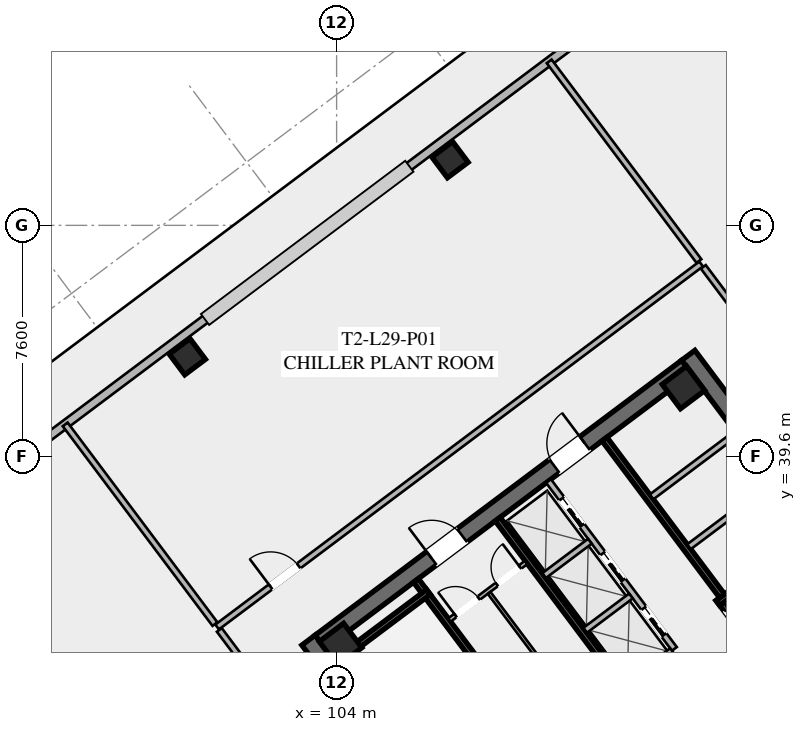
"""IFC4 building model, lengths in metres.
Left out: names, types, materials, properties, quantities, classifications, styles, units other than length and angle.
Written with IfcOpenShell. Run it as: python <this file> out.ifc"""

import sys

from ifc_helpers import new_model, si_unit, direction, frame, frame_2d, origin, origin_2d, place, context, subcontext, project, spatial, rectangle, hollow_rectangle, extrude, element, fill, save


model = new_model("IFC4")
c1 = context("Model", 3, precision=1e-05, world=origin(), true_north=direction((0.0, 1.0)))
c2 = subcontext(c1, "Body", "Model", "MODEL_VIEW")
j1 = project(units=[si_unit("LENGTHUNIT", "METRE"), si_unit("PLANEANGLEUNIT", "RADIAN")], contexts=[c1])
p1 = place(None, origin())
s1 = spatial("IfcSite", under=j1, at=p1, CompositionType="ELEMENT")
p2 = place(p1, origin())
s2 = spatial("IfcBuilding", under=s1, at=p2, CompositionType="ELEMENT")
p3 = place(p2, frame((0.0, 0.0, 109.8)))
s3 = spatial("IfcBuildingStorey", under=s2, at=p3, CompositionType="ELEMENT", Elevation=109.8)
for number, where, z_axis, x_axis in (
    (1, (112.436, 21.077, 0.0), (0.0, 0.0, 1.0), (-0.6, 0.8, 0.0)),
    (2, (115.564, 42.923, 0.0), (0.0, 0.0, 1.0), (0.6, -0.8, 0.0)),
):
    element("IfcWall", number, at=place(p3, frame(where, z_axis=z_axis, x_axis=x_axis)), inside=s3, PredefinedType="SHEAR", context=c2, shape_type="SweptSolid", body=[
        extrude(rectangle(XDim=15.6, YDim=0.55, at=frame_2d((7.8, 0.0))), origin(), (0.0, 0.0, 1.0), 4.6),
    ])
p4 = place(p3, frame((103.461, 33.502, 0.0), z_axis=(0.0, 0.0, 1.0), x_axis=(0.799998054672, 0.600002593761, 0.0)))
e3 = element("IfcWall", 3, at=p4, inside=s3, PredefinedType="SHEAR", context=c2, shape_type="SweptSolid", body=[
    extrude(rectangle(XDim=15.06, YDim=0.55, at=frame_2d((7.53, 0.0))), origin(), (0.0, 0.0, 1.0), 4.6),
])
p5 = place(p4, frame((4.58, 0.0, 0.0)))
e4 = element("IfcOpeningElement", 4, at=p5, cuts=e3, PredefinedType="OPENING", context=c2, shape_type="SweptSolid", body=[
    extrude(rectangle(XDim=1.25, YDim=2.25, at=frame_2d((0.625, 1.125))), frame((0.0, 0.285, 0.0), z_axis=(0.0, -1.0, 0.0), x_axis=(1.0, 0.0, 0.0)), (0.0, 0.0, 1.0), 0.57),
])
p6 = place(p4, frame((9.63, 0.0, 0.0)))
e5 = element("IfcOpeningElement", 5, at=p6, cuts=e3, PredefinedType="OPENING", context=c2, shape_type="SweptSolid", body=[
    extrude(rectangle(XDim=1.25, YDim=2.25, at=frame_2d((0.625, 1.125))), frame((0.0, 0.285, 0.0), z_axis=(0.0, -1.0, 0.0), x_axis=(1.0, 0.0, 0.0)), (0.0, 0.0, 1.0), 0.57),
])
for number, where, z_axis, x_axis in (
    (6, (115.41, 41.87, 0.0), (0.0, 0.0, 1.0), (0.8, 0.6, 0.0)),
    (7, (104.13, 33.41, 0.0), (0.0, 0.0, 1.0), (0.8, 0.6, 0.0)),
):
    element("IfcColumn", number, at=place(p3, frame(where, z_axis=z_axis, x_axis=x_axis)), inside=s3, PredefinedType="COLUMN", context=c2, shape_type="SweptSolid", body=[
        extrude(hollow_rectangle(XDim=1.0, YDim=1.0, WallThickness=0.04, at=origin_2d()), origin(), (0.0, 0.0, 1.0), 4.42),
    ])
for number, where, z_axis, x_axis in (
    (8, (107.73, 49.36, -0.295), (0.0, 0.0, 1.0), (0.8, 0.6, 0.0)),
    (9, (99.09, 42.88, -0.295), (0.0, 0.0, 1.0), (0.8, 0.6, 0.0)),
):
    element("IfcColumn", number, at=place(p3, frame(where, z_axis=z_axis, x_axis=x_axis)), inside=s3, PredefinedType="COLUMN", context=c2, shape_type="SweptSolid", body=[
        extrude(hollow_rectangle(XDim=0.85, YDim=0.85, WallThickness=0.035, at=origin_2d()), origin(), (0.0, 0.0, 1.0), 4.715),
    ])
for number, where, z_axis, x_axis in (
    (10, (108.904, 8.328, 0.0), (0.0, 0.0, 1.0), (-0.6, 0.8, 0.0)),
    (11, (90.328, 37.096, 0.0), (0.0, 0.0, 1.0), (0.8, 0.6, 0.0)),
):
    element("IfcWall", number, at=place(p3, frame(where, z_axis=z_axis, x_axis=x_axis)), inside=s3, PredefinedType="SOLIDWALL", context=c2, shape_type="SweptSolid", body=[
        extrude(rectangle(XDim=31.76, YDim=0.28, at=frame_2d((15.88, 0.0))), origin(), (0.0, 0.0, 1.0), 4.42),
    ])
p7 = place(p3, frame((111.44, 29.08, 0.0), z_axis=(0.0, 0.0, 1.0), x_axis=(-0.59999029481, 0.8000072788, 0.0)))
e12 = element("IfcWall", 12, at=p7, inside=s3, PredefinedType="SHEAR", context=c2, shape_type="SweptSolid", body=[
    extrude(rectangle(XDim=8.05, YDim=0.2, at=frame_2d((4.025, 0.0))), origin(), (0.0, 0.0, 1.0), 4.42),
])
p8 = place(p7, frame((0.45, 0.0, 0.0)))
e13 = element("IfcOpeningElement", 13, at=p8, cuts=e12, PredefinedType="OPENING", context=c2, shape_type="SweptSolid", body=[
    extrude(rectangle(XDim=1.15, YDim=2.2, at=frame_2d((0.575, 1.1))), frame((0.0, 0.11, 0.0), z_axis=(0.0, -1.0, 0.0), x_axis=(1.0, 0.0, 0.0)), (0.0, 0.0, 1.0), 0.22),
])
p9 = place(p3, frame((103.956, 32.842, 0.0), z_axis=(0.0, 0.0, 1.0), x_axis=(0.800015298837, 0.599979601008, 0.0)))
e14 = element("IfcWall", 14, at=p9, inside=s3, PredefinedType="SHEAR", context=c2, shape_type="SweptSolid", body=[
    extrude(rectangle(XDim=3.83, YDim=0.2, at=frame_2d((1.915, 0.0))), origin(), (0.0, 0.0, 1.0), 4.42),
])
p10 = place(p3, frame((116.56, 34.92, 0.0), z_axis=(0.0, 0.0, 1.0), x_axis=(0.59999029481, -0.8000072788, 0.0)))
e15 = element("IfcWall", 15, at=p10, inside=s3, PredefinedType="SHEAR", context=c2, shape_type="SweptSolid", body=[
    extrude(rectangle(XDim=8.05, YDim=0.2, at=frame_2d((4.025, 0.0))), origin(), (0.0, 0.0, 1.0), 4.42),
])
p11 = place(p10, frame((0.45, 0.0, 0.0)))
e16 = element("IfcOpeningElement", 16, at=p11, cuts=e15, PredefinedType="OPENING", context=c2, shape_type="SweptSolid", body=[
    extrude(rectangle(XDim=1.15, YDim=2.2, at=frame_2d((0.575, 1.1))), frame((0.0, 0.11, 0.0), z_axis=(0.0, -1.0, 0.0), x_axis=(1.0, 0.0, 0.0)), (0.0, 0.0, 1.0), 0.22),
])
p12 = place(p3, frame((116.54, 34.78, 0.0), z_axis=(0.0, 0.0, 1.0), x_axis=(0.800015298837, 0.599979601008, 0.0)))
e17 = element("IfcWall", 17, at=p12, inside=s3, PredefinedType="SHEAR", context=c2, shape_type="SweptSolid", body=[
    extrude(rectangle(XDim=3.83, YDim=0.2, at=frame_2d((1.915, 0.0))), origin(), (0.0, 0.0, 1.0), 4.42),
])
p13 = place(p3, frame((117.998, 25.936, 0.0), z_axis=(0.0, 0.0, 1.0), x_axis=(-0.600002693989, 0.799997979501, 0.0)))
e18 = element("IfcWall", 18, at=p13, inside=s3, PredefinedType="SHEAR", context=c2, shape_type="SweptSolid", body=[
    extrude(rectangle(XDim=14.5, YDim=0.2, at=frame_2d((7.25, 0.0))), origin(), (0.0, 0.0, 1.0), 4.42),
])
p14 = place(p3, frame((112.81, 40.17, 0.0), z_axis=(0.0, 0.0, 1.0), x_axis=(0.599993943644, -0.800004542231, 0.0)))
e19 = element("IfcWall", 19, at=p14, inside=s3, PredefinedType="SHEAR", context=c2, shape_type="SweptSolid", body=[
    extrude(rectangle(XDim=6.45, YDim=0.2, at=frame_2d((3.225, 0.0))), origin(), (0.0, 0.0, 1.0), 4.42),
])
for number, where, z_axis, x_axis in (
    (20, (115.59, 36.63, 0.0), (0.0, 0.0, 1.0), (0.8, 0.6, 0.0)),
    (21, (114.36, 38.27, 0.0), (0.0, 0.0, 1.0), (0.8, 0.6, 0.0)),
):
    element("IfcWall", number, at=place(p3, frame(where, z_axis=z_axis, x_axis=x_axis)), inside=s3, PredefinedType="SOLIDWALL", context=c2, shape_type="SweptSolid", body=[
        extrude(rectangle(XDim=3.48, YDim=0.2, at=frame_2d((1.74, 0.0))), origin(), (0.0, 0.0, 1.0), 4.42),
    ])
p15 = place(p3, frame((107.71, 34.22, 0.0), z_axis=(0.0, 0.0, 1.0), x_axis=(0.799981399002, 0.60002480053, 0.0)))
e22 = element("IfcWall", 22, at=p15, inside=s3, PredefinedType="PARTITIONING", context=c2, shape_type="SweptSolid", body=[
    extrude(rectangle(XDim=3.15, YDim=0.135, at=frame_2d((1.575, 0.0))), origin(), (0.0, 0.0, 1.0), 3.531),
])
p16 = place(p15, frame((0.25, 0.0, 0.0)))
e23 = element("IfcOpeningElement", 23, at=p16, cuts=e22, PredefinedType="OPENING", context=c2, shape_type="SweptSolid", body=[
    extrude(rectangle(XDim=0.95, YDim=2.05, at=frame_2d((0.475, 1.025))), frame((0.0, 0.077, 0.0), z_axis=(0.0, -1.0, 0.0), x_axis=(1.0, 0.0, 0.0)), (0.0, 0.0, 1.0), 0.155),
])
p17 = place(p15, frame((1.95, 0.0, 0.0)))
e24 = element("IfcOpeningElement", 24, at=p17, cuts=e22, PredefinedType="OPENING", context=c2, shape_type="SweptSolid", body=[
    extrude(rectangle(XDim=0.95, YDim=2.05, at=frame_2d((0.475, 1.025))), frame((0.0, 0.077, 0.0), z_axis=(0.0, -1.0, 0.0), x_axis=(1.0, 0.0, 0.0)), (0.0, 0.0, 1.0), 0.155),
])
p18 = place(p3, frame((111.296, 32.072, 0.0), z_axis=(0.0, 0.0, 1.0), x_axis=(-0.59995887973, 0.800030838552, 0.0)))
e25 = element("IfcWall", 25, at=p18, inside=s3, PredefinedType="PARTITIONING", context=c2, shape_type="SweptSolid", body=[
    extrude(rectangle(XDim=3.8, YDim=0.11, at=frame_2d((1.9, 0.0))), origin(), (0.0, 0.0, 1.0), 3.531),
])
p19 = place(p3, frame((115.11, 33.27, 0.0), z_axis=(0.0, 0.0, 1.0), x_axis=(-0.600011322243, 0.799991508192, 0.0)))
e26 = element("IfcWall", 26, at=p19, inside=s3, PredefinedType="SOLIDWALL", context=c2, shape_type="SweptSolid", body=[
    extrude(rectangle(XDim=6.9, YDim=0.2, at=frame_2d((3.45, 0.0))), origin(), (0.0, 0.0, 1.0), 4.42),
])
p20 = place(p19, frame((0.575, 0.0, 0.0)))
e27 = element("IfcOpeningElement", 27, at=p20, cuts=e26, PredefinedType="OPENING", context=c2, shape_type="SweptSolid", body=[
    extrude(rectangle(XDim=1.1, YDim=2.2, at=frame_2d((0.55, 1.1))), frame((0.0, 0.11, 0.0), z_axis=(0.0, -1.0, 0.0), x_axis=(1.0, 0.0, 0.0)), (0.0, 0.0, 1.0), 0.22),
])
p21 = place(p19, frame((2.825, 0.0, 0.0)))
e28 = element("IfcOpeningElement", 28, at=p21, cuts=e26, PredefinedType="OPENING", context=c2, shape_type="SweptSolid", body=[
    extrude(rectangle(XDim=1.1, YDim=2.2, at=frame_2d((0.55, 1.1))), frame((0.0, 0.11, 0.0), z_axis=(0.0, -1.0, 0.0), x_axis=(1.0, 0.0, 0.0)), (0.0, 0.0, 1.0), 0.22),
])
p22 = place(p19, frame((5.075, 0.0, 0.0)))
e29 = element("IfcOpeningElement", 29, at=p22, cuts=e26, PredefinedType="OPENING", context=c2, shape_type="SweptSolid", body=[
    extrude(rectangle(XDim=1.1, YDim=2.2, at=frame_2d((0.55, 1.1))), frame((0.0, 0.11, 0.0), z_axis=(0.0, -1.0, 0.0), x_axis=(1.0, 0.0, 0.0)), (0.0, 0.0, 1.0), 0.22),
])
p23 = place(p3, frame((113.526, 32.082, 0.0), z_axis=(0.0, 0.0, 1.0), x_axis=(0.800046745961, 0.599937666993, 0.0)))
e30 = element("IfcWall", 30, at=p23, inside=s3, PredefinedType="SOLIDWALL", context=c2, shape_type="SweptSolid", body=[
    extrude(rectangle(XDim=1.88, YDim=0.2, at=frame_2d((0.94, 0.0))), origin(), (0.0, 0.0, 1.0), 4.42),
])
p24 = place(p3, frame((112.176, 33.882, 0.0), z_axis=(0.0, 0.0, 1.0), x_axis=(0.8, 0.6, 0.0)))
e31 = element("IfcWall", 31, at=p24, inside=s3, PredefinedType="SOLIDWALL", context=c2, shape_type="SweptSolid", body=[
    extrude(rectangle(XDim=1.88, YDim=0.2, at=frame_2d((0.94, 0.0))), origin(), (0.0, 0.0, 1.0), 4.42),
])
p25 = place(p3, frame((110.826, 35.682, 0.0), z_axis=(0.0, 0.0, 1.0), x_axis=(0.799984418148, 0.600020775241, 0.0)))
e32 = element("IfcWall", 32, at=p25, inside=s3, PredefinedType="SOLIDWALL", context=c2, shape_type="SweptSolid", body=[
    extrude(rectangle(XDim=1.88, YDim=0.2, at=frame_2d((0.94, 0.0))), origin(), (0.0, 0.0, 1.0), 4.42),
])
p26 = place(p3, frame((100.07, 33.99, 0.0), z_axis=(0.0, 0.0, 1.0), x_axis=(0.8, 0.6, 0.0)))
e33 = element("IfcWall", 33, at=p26, inside=s3, PredefinedType="SOLIDWALL", context=c2, shape_type="SweptSolid", body=[
    extrude(rectangle(XDim=19.9, YDim=0.2, at=frame_2d((9.95, 0.0))), origin(), (0.0, 0.0, 1.0), 3.531),
])
p27 = place(p26, frame((2.2, 0.0, 0.0)))
e34 = element("IfcOpeningElement", 34, at=p27, cuts=e33, PredefinedType="OPENING", context=c2, shape_type="SweptSolid", body=[
    extrude(rectangle(XDim=1.15, YDim=2.2, at=frame_2d((0.575, 1.1))), frame((0.0, 0.11, 0.0), z_axis=(0.0, -1.0, 0.0), x_axis=(1.0, 0.0, 0.0)), (0.0, 0.0, 1.0), 0.22),
])
p28 = place(p3, frame((116.062, 45.834, 0.0), z_axis=(0.0, 0.0, 1.0), x_axis=(0.599987849816, -0.800009112494, 0.0)))
e35 = element("IfcWall", 35, at=p28, inside=s3, PredefinedType="SOLIDWALL", context=c2, shape_type="SweptSolid", body=[
    extrude(rectangle(XDim=6.43, YDim=0.2, at=frame_2d((3.215, 0.0))), origin(), (0.0, 0.0, 1.0), 3.531),
])
p29 = place(p28, frame((3.0, 0.0, 0.0)))
e36 = element("IfcOpeningElement", 36, at=p29, cuts=e35, PredefinedType="OPENING", context=c2, shape_type="SweptSolid", body=[
    extrude(rectangle(XDim=1.25, YDim=2.25, at=frame_2d((0.625, 1.125))), frame((0.0, 0.11, 0.0), z_axis=(0.0, -1.0, 0.0), x_axis=(1.0, 0.0, 0.0)), (0.0, 0.0, 1.0), 0.22),
])
p30 = place(p3, frame((111.938, 18.166, 0.0), z_axis=(0.0, 0.0, 1.0), x_axis=(-0.59999602618, 0.80000298035, 0.0)))
e37 = element("IfcWall", 37, at=p30, inside=s3, PredefinedType="SOLIDWALL", context=c2, shape_type="SweptSolid", body=[
    extrude(rectangle(XDim=19.66, YDim=0.2, at=frame_2d((9.83, 0.0))), origin(), (0.0, 0.0, 1.0), 3.531),
])
p31 = place(p30, frame((3.0, 0.0, 0.0)))
e38 = element("IfcOpeningElement", 38, at=p31, cuts=e37, PredefinedType="OPENING", context=c2, shape_type="SweptSolid", body=[
    extrude(rectangle(XDim=1.25, YDim=2.25, at=frame_2d((0.625, 1.125))), frame((0.0, 0.11, 0.0), z_axis=(0.0, -1.0, 0.0), x_axis=(1.0, 0.0, 0.0)), (0.0, 0.0, 1.0), 0.22),
])
p32 = place(p30, frame((13.2, 0.0, 0.0)))
e39 = element("IfcOpeningElement", 39, at=p32, cuts=e37, PredefinedType="OPENING", context=c2, shape_type="SweptSolid", body=[
    extrude(rectangle(XDim=1.15, YDim=2.2, at=frame_2d((0.575, 1.1))), frame((0.0, 0.11, 0.0), z_axis=(0.0, -1.0, 0.0), x_axis=(1.0, 0.0, 0.0)), (0.0, 0.0, 1.0), 0.22),
])
for number, where, z_axis, x_axis in (
    (40, (99.998, 34.086, 0.0), (0.0, 0.0, 1.0), (-0.6, 0.8, 0.0)),
    (41, (115.918, 46.026, 0.0), (0.0, 0.0, 1.0), (-0.6, 0.8, 0.0)),
):
    element("IfcWall", number, at=place(p3, frame(where, z_axis=z_axis, x_axis=x_axis)), inside=s3, PredefinedType="SOLIDWALL", context=c2, shape_type="SweptSolid", body=[
        extrude(rectangle(XDim=8.21, YDim=0.2, at=frame_2d((4.105, 0.0))), origin(), (0.0, 0.0, 1.0), 3.531),
    ])
p33 = place(p5, origin())
e42 = element("IfcDoor", 42, at=p33, inside=s3, OperationType="SINGLE_SWING_LEFT", PredefinedType="DOOR", context=c2, shape_type="SweptSolid", body=[
    extrude(rectangle(XDim=1.25, YDim=2.25, at=frame_2d((0.625, 1.125))), frame((0.0, 0.025, 0.0), z_axis=(0.0, -1.0, 0.0), x_axis=(1.0, 0.0, 0.0)), (0.0, 0.0, 1.0), 0.05),
])
fill(e4, e42)
p34 = place(p6, origin())
e43 = element("IfcDoor", 43, at=p34, inside=s3, OperationType="SINGLE_SWING_RIGHT", PredefinedType="DOOR", context=c2, shape_type="SweptSolid", body=[
    extrude(rectangle(XDim=1.25, YDim=2.25, at=frame_2d((0.625, 1.125))), frame((0.0, 0.025, 0.0), z_axis=(0.0, -1.0, 0.0), x_axis=(1.0, 0.0, 0.0)), (0.0, 0.0, 1.0), 0.05),
])
fill(e5, e43)
p35 = place(p11, origin())
e44 = element("IfcDoor", 44, at=p35, inside=s3, OperationType="SINGLE_SWING_RIGHT", PredefinedType="DOOR", context=c2, shape_type="SweptSolid", body=[
    extrude(rectangle(XDim=1.15, YDim=2.2, at=frame_2d((0.575, 1.1))), frame((0.0, 0.025, 0.0), z_axis=(0.0, -1.0, 0.0), x_axis=(1.0, 0.0, 0.0)), (0.0, 0.0, 1.0), 0.05),
])
fill(e16, e44)
p36 = place(p16, origin())
e45 = element("IfcDoor", 45, at=p36, inside=s3, OperationType="SINGLE_SWING_LEFT", PredefinedType="DOOR", context=c2, shape_type="SweptSolid", body=[
    extrude(rectangle(XDim=0.95, YDim=2.05, at=frame_2d((0.475, 1.025))), frame((0.0, 0.025, 0.0), z_axis=(0.0, -1.0, 0.0), x_axis=(1.0, 0.0, 0.0)), (0.0, 0.0, 1.0), 0.05),
])
fill(e23, e45)
p37 = place(p17, origin())
e46 = element("IfcDoor", 46, at=p37, inside=s3, OperationType="SINGLE_SWING_RIGHT", PredefinedType="DOOR", context=c2, shape_type="SweptSolid", body=[
    extrude(rectangle(XDim=0.95, YDim=2.05, at=frame_2d((0.475, 1.025))), frame((0.0, 0.025, 0.0), z_axis=(0.0, -1.0, 0.0), x_axis=(1.0, 0.0, 0.0)), (0.0, 0.0, 1.0), 0.05),
])
fill(e24, e46)
p38 = place(p27, origin())
e47 = element("IfcDoor", 47, at=p38, inside=s3, OperationType="SINGLE_SWING_LEFT", PredefinedType="DOOR", context=c2, shape_type="SweptSolid", body=[
    extrude(rectangle(XDim=1.15, YDim=2.2, at=frame_2d((0.575, 1.1))), frame((0.0, 0.025, 0.0), z_axis=(0.0, -1.0, 0.0), x_axis=(1.0, 0.0, 0.0)), (0.0, 0.0, 1.0), 0.05),
])
fill(e34, e47)
p39 = place(p20, origin())
e48 = element("IfcDoor", 48, at=p39, inside=s3, OperationType="SLIDING_TO_LEFT", PredefinedType="DOOR", context=c2, shape_type="SweptSolid", body=[
    extrude(rectangle(XDim=1.1, YDim=2.2, at=frame_2d((0.55, 1.1))), frame((0.0, 0.025, 0.0), z_axis=(0.0, -1.0, 0.0), x_axis=(1.0, 0.0, 0.0)), (0.0, 0.0, 1.0), 0.05),
])
fill(e27, e48)
p40 = place(p21, origin())
e49 = element("IfcDoor", 49, at=p40, inside=s3, OperationType="SLIDING_TO_LEFT", PredefinedType="DOOR", context=c2, shape_type="SweptSolid", body=[
    extrude(rectangle(XDim=1.1, YDim=2.2, at=frame_2d((0.55, 1.1))), frame((0.0, 0.025, 0.0), z_axis=(0.0, -1.0, 0.0), x_axis=(1.0, 0.0, 0.0)), (0.0, 0.0, 1.0), 0.05),
])
fill(e28, e49)
p41 = place(p22, origin())
e50 = element("IfcDoor", 50, at=p41, inside=s3, OperationType="SLIDING_TO_LEFT", PredefinedType="DOOR", context=c2, shape_type="SweptSolid", body=[
    extrude(rectangle(XDim=1.1, YDim=2.2, at=frame_2d((0.55, 1.1))), frame((0.0, 0.025, 0.0), z_axis=(0.0, -1.0, 0.0), x_axis=(1.0, 0.0, 0.0)), (0.0, 0.0, 1.0), 0.05),
])
fill(e29, e50)
save(model, sys.argv[1])
